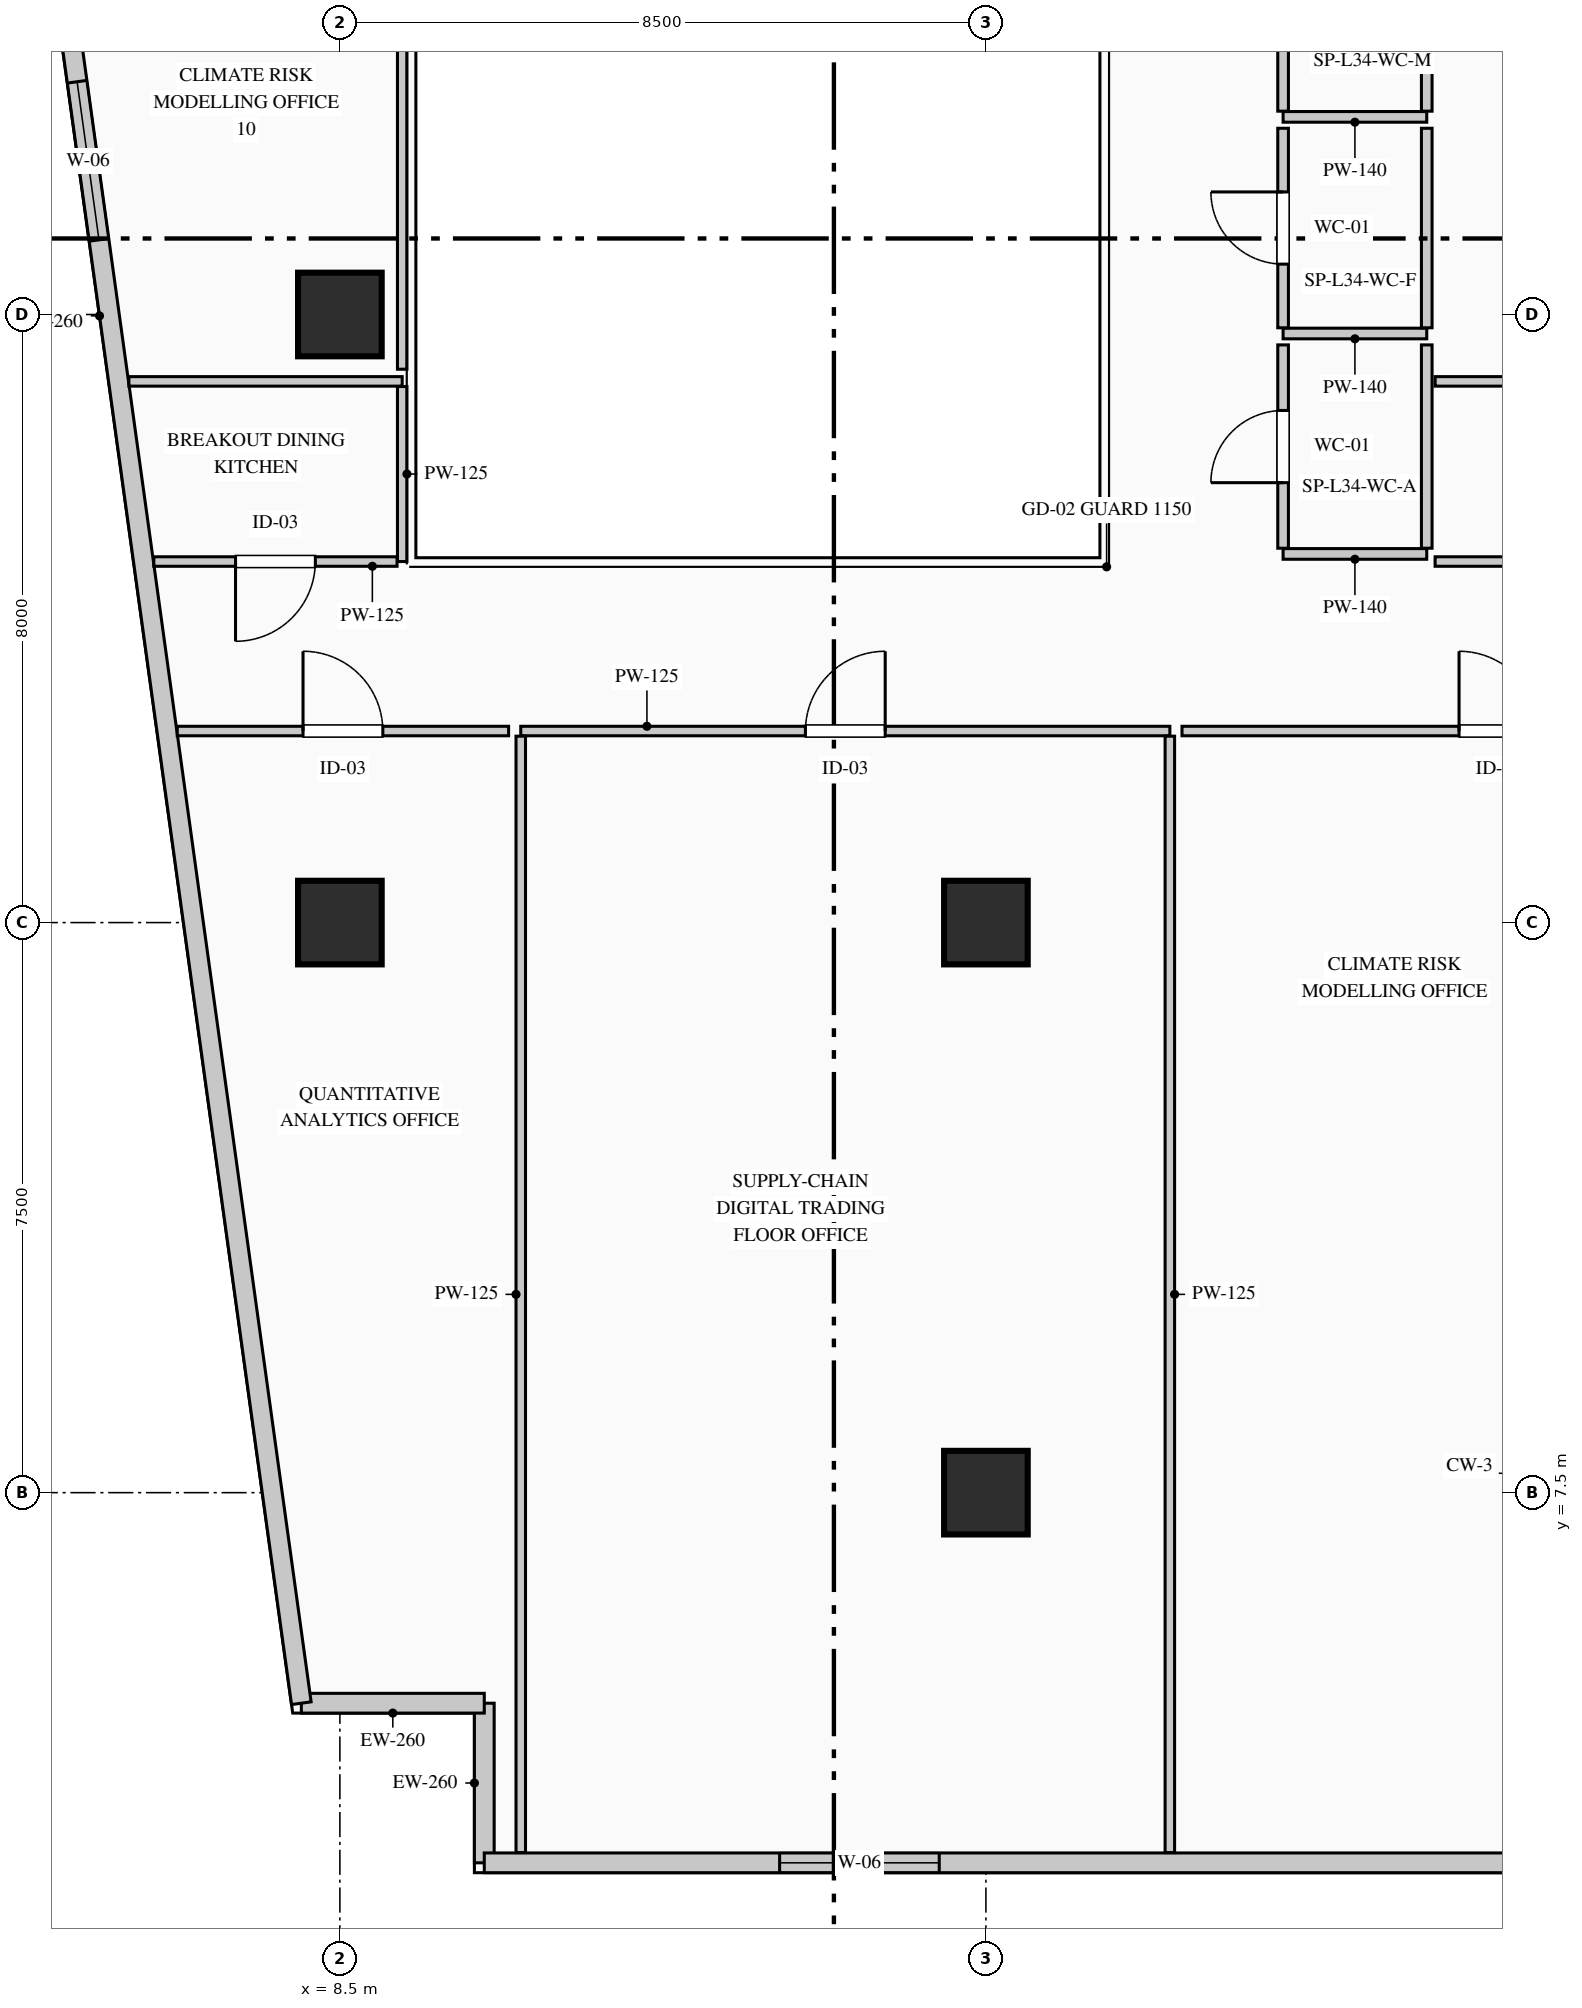
"""IFC4 building model, lengths in metres.
Left out: names, types, materials, properties, quantities, classifications, styles, units other than length and angle.
Written with IfcOpenShell. Run it as: python <this file> out.ifc"""

import sys

from ifc_helpers import new_model, si_unit, direction, frame, frame_2d, origin, origin_2d, place, context, subcontext, project, spatial, rectangle, extrude, element, fill, save


model = new_model("IFC4")
c1 = context("Model", 3, precision=1e-05, world=origin(), true_north=direction((0.0, 1.0)))
c2 = subcontext(c1, "Body", "Model", "MODEL_VIEW")
j1 = project(units=[si_unit("LENGTHUNIT", "METRE"), si_unit("PLANEANGLEUNIT", "RADIAN")], contexts=[c1])
p1 = place(None, origin())
s1 = spatial("IfcSite", under=j1, at=p1, CompositionType="ELEMENT")
p2 = place(p1, origin())
s2 = spatial("IfcBuilding", under=s1, at=p2, CompositionType="ELEMENT")
p3 = place(p2, frame((0.0, 0.0, 146.95)))
s3 = spatial("IfcBuildingStorey", under=s2, at=p3, CompositionType="ELEMENT", Elevation=146.95)
for number, where, z_axis, x_axis in (
    (1, (8.5, 15.0, 0.0), (0.0, 0.0, 1.0), (1.0, 0.0, 0.0)),
    (2, (8.5, 23.0, 0.0), (0.0, 0.0, 1.0), (1.0, 0.0, 0.0)),
    (3, (17.0, 7.5, 0.0), (0.0, 0.0, 1.0), (1.0, 0.0, 0.0)),
    (4, (17.0, 15.0, 0.0), (0.0, 0.0, 1.0), (1.0, 0.0, 0.0)),
):
    element("IfcColumn", number, at=place(p3, frame(where, z_axis=z_axis, x_axis=x_axis)), inside=s3, PredefinedType="COLUMN", context=c2, shape_type="SweptSolid", body=[
        extrude(rectangle(XDim=1.1, YDim=1.1, at=origin_2d()), origin(), (0.0, 0.0, 1.0), 3.95),
    ])
p4 = place(p3, frame((10.4, 2.63, 0.0), z_axis=(0.0, 0.0, 1.0), x_axis=(0.0, 1.0, 0.0)))
e5 = element("IfcWall", 5, at=p4, inside=s3, PredefinedType="STANDARD", context=c2, shape_type="SweptSolid", body=[
    extrude(rectangle(XDim=2.1, YDim=0.26, at=frame_2d((1.05, 0.0))), origin(), (0.0, 0.0, 1.0), 3.69),
])
p5 = place(p3, frame((10.4, 4.73, 0.0), z_axis=(0.0, 0.0, 1.0), x_axis=(-1.0, 0.0, 0.0)))
e6 = element("IfcWall", 6, at=p5, inside=s3, PredefinedType="STANDARD", context=c2, shape_type="SweptSolid", body=[
    extrude(rectangle(XDim=2.407, YDim=0.26, at=frame_2d((1.204, 0.0))), origin(), (0.0, 0.0, 1.0), 3.69),
])
p6 = place(p3, frame((7.993, 4.73, 0.0), z_axis=(0.0, 0.0, 1.0), x_axis=(-0.136989009016, 0.990572567462, 0.0)))
e7 = element("IfcWall", 7, at=p6, inside=s3, PredefinedType="STANDARD", context=c2, shape_type="SweptSolid", body=[
    extrude(rectangle(XDim=36.888, YDim=0.26, at=frame_2d((18.444, 0.0))), origin(), (0.0, 0.0, 1.0), 3.69),
])
p7 = place(p6, frame((19.435, 0.0, 0.9)))
e8 = element("IfcOpeningElement", 8, at=p7, cuts=e7, PredefinedType="OPENING", context=c2, shape_type="SweptSolid", body=[
    extrude(rectangle(XDim=2.1, YDim=2.0, at=frame_2d((1.05, 1.0))), frame((0.0, 0.14, 0.0), z_axis=(0.0, -1.0, 0.0), x_axis=(1.0, 0.0, 0.0)), (0.0, 0.0, 1.0), 0.28),
])
p8 = place(p3, frame((24.11, 2.63, 0.0), z_axis=(0.0, 0.0, 1.0), x_axis=(-1.0, 0.0, 0.0)))
e9 = element("IfcWall", 9, at=p8, inside=s3, PredefinedType="STANDARD", context=c2, shape_type="SweptSolid", body=[
    extrude(rectangle(XDim=13.71, YDim=0.26, at=frame_2d((6.855, 0.0))), origin(), (0.0, 0.0, 1.0), 3.69),
])
p9 = place(p8, frame((7.724, 0.0, 0.9)))
e10 = element("IfcOpeningElement", 10, at=p9, cuts=e9, PredefinedType="OPENING", context=c2, shape_type="SweptSolid", body=[
    extrude(rectangle(XDim=2.1, YDim=2.0, at=frame_2d((1.05, 1.0))), frame((0.0, 0.14, 0.0), z_axis=(0.0, -1.0, 0.0), x_axis=(1.0, 0.0, 0.0)), (0.0, 0.0, 1.0), 0.28),
])
p10 = place(p3, frame((22.8, 25.6, 0.0), z_axis=(0.0, 0.0, 1.0), x_axis=(-1.0, 0.0, 0.0)))
e11 = element("IfcWall", 11, at=p10, inside=s3, PredefinedType="PARTITIONING", context=c2, shape_type="SweptSolid", body=[
    extrude(rectangle(XDim=1.89, YDim=0.14, at=frame_2d((0.945, 0.0))), origin(), (0.0, 0.0, 1.0), 3.69),
])
p11 = place(p3, frame((20.91, 25.675, 0.0), z_axis=(0.0, 0.0, 1.0), x_axis=(0.0, 1.0, 0.0)))
e12 = element("IfcWall", 12, at=p11, inside=s3, PredefinedType="PARTITIONING", context=c2, shape_type="SweptSolid", body=[
    extrude(rectangle(XDim=2.775, YDim=0.14, at=frame_2d((1.387, 0.0))), origin(), (0.0, 0.0, 1.0), 3.69),
])
p12 = place(p11, frame((0.913, 0.0, 0.0)))
e13 = element("IfcOpeningElement", 13, at=p12, cuts=e12, PredefinedType="OPENING", context=c2, shape_type="SweptSolid", body=[
    extrude(rectangle(XDim=0.95, YDim=2.15, at=frame_2d((0.475, 1.075))), frame((0.0, 0.08, 0.0), z_axis=(0.0, -1.0, 0.0), x_axis=(1.0, 0.0, 0.0)), (0.0, 0.0, 1.0), 0.16),
])
p13 = place(p3, frame((22.8, 28.375, 0.0), z_axis=(0.0, 0.0, 1.0), x_axis=(0.0, -1.0, 0.0)))
e14 = element("IfcWall", 14, at=p13, inside=s3, PredefinedType="PARTITIONING", context=c2, shape_type="SweptSolid", body=[
    extrude(rectangle(XDim=2.7, YDim=0.14, at=frame_2d((1.35, 0.0))), origin(), (0.0, 0.0, 1.0), 3.315),
])
p14 = place(p3, frame((22.8, 22.75, 0.0), z_axis=(0.0, 0.0, 1.0), x_axis=(-1.0, 0.0, 0.0)))
e15 = element("IfcWall", 15, at=p14, inside=s3, PredefinedType="PARTITIONING", context=c2, shape_type="SweptSolid", body=[
    extrude(rectangle(XDim=1.89, YDim=0.14, at=frame_2d((0.945, 0.0))), origin(), (0.0, 0.0, 1.0), 3.69),
])
p15 = place(p3, frame((20.91, 22.825, 0.0), z_axis=(0.0, 0.0, 1.0), x_axis=(0.0, 1.0, 0.0)))
e16 = element("IfcWall", 16, at=p15, inside=s3, PredefinedType="PARTITIONING", context=c2, shape_type="SweptSolid", body=[
    extrude(rectangle(XDim=2.625, YDim=0.14, at=frame_2d((1.312, 0.0))), origin(), (0.0, 0.0, 1.0), 3.69),
])
p16 = place(p15, frame((0.837, 0.0, 0.0)))
e17 = element("IfcOpeningElement", 17, at=p16, cuts=e16, PredefinedType="OPENING", context=c2, shape_type="SweptSolid", body=[
    extrude(rectangle(XDim=0.95, YDim=2.15, at=frame_2d((0.475, 1.075))), frame((0.0, 0.08, 0.0), z_axis=(0.0, -1.0, 0.0), x_axis=(1.0, 0.0, 0.0)), (0.0, 0.0, 1.0), 0.16),
])
p17 = place(p3, frame((22.8, 25.45, 0.0), z_axis=(0.0, 0.0, 1.0), x_axis=(0.0, -1.0, 0.0)))
e18 = element("IfcWall", 18, at=p17, inside=s3, PredefinedType="PARTITIONING", context=c2, shape_type="SweptSolid", body=[
    extrude(rectangle(XDim=2.625, YDim=0.14, at=frame_2d((1.312, 0.0))), origin(), (0.0, 0.0, 1.0), 3.315),
])
p18 = place(p3, frame((22.8, 19.85, 0.0), z_axis=(0.0, 0.0, 1.0), x_axis=(-1.0, 0.0, 0.0)))
e19 = element("IfcWall", 19, at=p18, inside=s3, PredefinedType="PARTITIONING", context=c2, shape_type="SweptSolid", body=[
    extrude(rectangle(XDim=1.89, YDim=0.14, at=frame_2d((0.945, 0.0))), origin(), (0.0, 0.0, 1.0), 3.69),
])
p19 = place(p3, frame((20.91, 19.925, 0.0), z_axis=(0.0, 0.0, 1.0), x_axis=(0.0, 1.0, 0.0)))
e20 = element("IfcWall", 20, at=p19, inside=s3, PredefinedType="PARTITIONING", context=c2, shape_type="SweptSolid", body=[
    extrude(rectangle(XDim=2.675, YDim=0.14, at=frame_2d((1.337, 0.0))), origin(), (0.0, 0.0, 1.0), 3.69),
])
p20 = place(p19, frame((0.863, 0.0, 0.0)))
e21 = element("IfcOpeningElement", 21, at=p20, cuts=e20, PredefinedType="OPENING", context=c2, shape_type="SweptSolid", body=[
    extrude(rectangle(XDim=0.95, YDim=2.15, at=frame_2d((0.475, 1.075))), frame((0.0, 0.08, 0.0), z_axis=(0.0, -1.0, 0.0), x_axis=(1.0, 0.0, 0.0)), (0.0, 0.0, 1.0), 0.16),
])
p21 = place(p3, frame((22.8, 22.6, 0.0), z_axis=(0.0, 0.0, 1.0), x_axis=(0.0, -1.0, 0.0)))
e22 = element("IfcWall", 22, at=p21, inside=s3, PredefinedType="PARTITIONING", context=c2, shape_type="SweptSolid", body=[
    extrude(rectangle(XDim=2.675, YDim=0.14, at=frame_2d((1.337, 0.0))), origin(), (0.0, 0.0, 1.0), 3.315),
])
p22 = place(p3, frame((10.88, 17.52, 0.0), z_axis=(0.0, 0.0, 1.0), x_axis=(1.0, 0.0, 0.0)))
e23 = element("IfcWall", 23, at=p22, inside=s3, PredefinedType="PARTITIONING", context=c2, shape_type="SweptSolid", body=[
    extrude(rectangle(XDim=8.54, YDim=0.125, at=frame_2d((4.27, 0.0))), origin(), (0.0, 0.0, 1.0), 3.69),
])
p23 = place(p22, frame((3.745, 0.0, 0.0)))
e24 = element("IfcOpeningElement", 24, at=p23, cuts=e23, PredefinedType="OPENING", context=c2, shape_type="SweptSolid", body=[
    extrude(rectangle(XDim=1.05, YDim=2.15, at=frame_2d((0.525, 1.075))), frame((0.0, 0.073, 0.0), z_axis=(0.0, -1.0, 0.0), x_axis=(1.0, 0.0, 0.0)), (0.0, 0.0, 1.0), 0.145),
])
for number, where, z_axis, x_axis in (
    (25, (19.42, 17.452, 0.0), (0.0, 0.0, 1.0), (0.0, -1.0, 0.0)),
    (26, (10.88, 2.765, 0.0), (0.0, 0.0, 1.0), (0.0, 1.0, 0.0)),
):
    element("IfcWall", number, at=place(p3, frame(where, z_axis=z_axis, x_axis=x_axis)), inside=s3, PredefinedType="PARTITIONING", context=c2, shape_type="SweptSolid", body=[
        extrude(rectangle(XDim=14.688, YDim=0.125, at=frame_2d((7.344, 0.0))), origin(), (0.0, 0.0, 1.0), 3.69),
    ])
p24 = place(p3, frame((19.58, 17.52, 0.0), z_axis=(0.0, 0.0, 1.0), x_axis=(1.0, 0.0, 0.0)))
e27 = element("IfcWall", 27, at=p24, inside=s3, PredefinedType="PARTITIONING", context=c2, shape_type="SweptSolid", body=[
    extrude(rectangle(XDim=8.34, YDim=0.125, at=frame_2d((4.17, 0.0))), origin(), (0.0, 0.0, 1.0), 3.475),
])
p25 = place(p24, frame((3.645, 0.0, 0.0)))
e28 = element("IfcOpeningElement", 28, at=p25, cuts=e27, PredefinedType="OPENING", context=c2, shape_type="SweptSolid", body=[
    extrude(rectangle(XDim=1.05, YDim=2.15, at=frame_2d((0.525, 1.075))), frame((0.0, 0.073, 0.0), z_axis=(0.0, -1.0, 0.0), x_axis=(1.0, 0.0, 0.0)), (0.0, 0.0, 1.0), 0.145),
])
p26 = place(p3, frame((6.36, 17.52, 0.0), z_axis=(0.0, 0.0, 1.0), x_axis=(1.0, 0.0, 0.0)))
e29 = element("IfcWall", 29, at=p26, inside=s3, PredefinedType="PARTITIONING", context=c2, shape_type="SweptSolid", body=[
    extrude(rectangle(XDim=4.36, YDim=0.125, at=frame_2d((2.18, 0.0))), origin(), (0.0, 0.0, 1.0), 3.69),
])
p27 = place(p26, frame((1.655, 0.0, 0.0)))
e30 = element("IfcOpeningElement", 30, at=p27, cuts=e29, PredefinedType="OPENING", context=c2, shape_type="SweptSolid", body=[
    extrude(rectangle(XDim=1.05, YDim=2.15, at=frame_2d((0.525, 1.075))), frame((0.0, 0.073, 0.0), z_axis=(0.0, -1.0, 0.0), x_axis=(1.0, 0.0, 0.0)), (0.0, 0.0, 1.0), 0.145),
])
p28 = place(p3, frame((25.976, 19.75, 0.0), z_axis=(0.0, 0.0, 1.0), x_axis=(-1.0, 0.0, 0.0)))
e31 = element("IfcWall", 31, at=p28, inside=s3, PredefinedType="PARTITIONING", context=c2, shape_type="SweptSolid", body=[
    extrude(rectangle(XDim=3.066, YDim=0.125, at=frame_2d((1.533, 0.0))), origin(), (0.0, 0.0, 1.0), 3.69),
])
p29 = place(p28, frame((1.008, 0.0, 0.0)))
e32 = element("IfcOpeningElement", 32, at=p29, cuts=e31, PredefinedType="OPENING", context=c2, shape_type="SweptSolid", body=[
    extrude(rectangle(XDim=1.05, YDim=2.15, at=frame_2d((0.525, 1.075))), frame((0.0, 0.073, 0.0), z_axis=(0.0, -1.0, 0.0), x_axis=(1.0, 0.0, 0.0)), (0.0, 0.0, 1.0), 0.145),
])
p30 = place(p3, frame((22.91, 22.12, 0.0), z_axis=(0.0, 0.0, 1.0), x_axis=(1.0, 0.0, 0.0)))
e33 = element("IfcWall", 33, at=p30, inside=s3, PredefinedType="PARTITIONING", context=c2, shape_type="SweptSolid", body=[
    extrude(rectangle(XDim=3.135, YDim=0.125, at=frame_2d((1.567, 0.0))), origin(), (0.0, 0.0, 1.0), 3.69),
])
p31 = place(p3, frame((5.724, 22.12, 0.0), z_axis=(0.0, 0.0, 1.0), x_axis=(1.0, 0.0, 0.0)))
e34 = element("IfcWall", 34, at=p31, inside=s3, PredefinedType="PARTITIONING", context=c2, shape_type="SweptSolid", body=[
    extrude(rectangle(XDim=3.596, YDim=0.125, at=frame_2d((1.798, 0.0))), origin(), (0.0, 0.0, 1.0), 3.69),
])
p32 = place(p3, frame((9.32, 22.052, 0.0), z_axis=(0.0, 0.0, 1.0), x_axis=(0.0, -1.0, 0.0)))
e35 = element("IfcWall", 35, at=p32, inside=s3, PredefinedType="PARTITIONING", context=c2, shape_type="SweptSolid", body=[
    extrude(rectangle(XDim=2.302, YDim=0.125, at=frame_2d((1.151, 0.0))), origin(), (0.0, 0.0, 1.0), 3.315),
])
p33 = place(p3, frame((9.252, 19.75, 0.0), z_axis=(0.0, 0.0, 1.0), x_axis=(-1.0, 0.0, 0.0)))
e36 = element("IfcWall", 36, at=p33, inside=s3, PredefinedType="PARTITIONING", context=c2, shape_type="SweptSolid", body=[
    extrude(rectangle(XDim=3.2, YDim=0.125, at=frame_2d((1.6, 0.0))), origin(), (0.0, 0.0, 1.0), 3.69),
])
p34 = place(p33, frame((1.075, 0.0, 0.0)))
e37 = element("IfcOpeningElement", 37, at=p34, cuts=e36, PredefinedType="OPENING", context=c2, shape_type="SweptSolid", body=[
    extrude(rectangle(XDim=1.05, YDim=2.15, at=frame_2d((0.525, 1.075))), frame((0.0, 0.073, 0.0), z_axis=(0.0, -1.0, 0.0), x_axis=(1.0, 0.0, 0.0)), (0.0, 0.0, 1.0), 0.145),
])
p35 = place(p3, frame((9.32, 28.502, 0.0), z_axis=(0.0, 0.0, 1.0), x_axis=(0.0, -1.0, 0.0)))
e38 = element("IfcWall", 38, at=p35, inside=s3, PredefinedType="PARTITIONING", context=c2, shape_type="SweptSolid", body=[
    extrude(rectangle(XDim=6.222, YDim=0.125, at=frame_2d((3.111, 0.0))), origin(), (0.0, 0.0, 1.0), 3.315),
])
p36 = place(p7, origin())
e39 = element("IfcWindow", 39, at=p36, inside=s3, PartitioningType="DOUBLE_PANEL_VERTICAL", PredefinedType="WINDOW", context=c2, shape_type="SweptSolid", body=[
    extrude(rectangle(XDim=2.1, YDim=2.0, at=frame_2d((1.05, 1.0))), frame((0.0, 0.03, 0.0), z_axis=(0.0, -1.0, 0.0), x_axis=(1.0, 0.0, 0.0)), (0.0, 0.0, 1.0), 0.06),
])
fill(e8, e39)
p37 = place(p9, origin())
e40 = element("IfcWindow", 40, at=p37, inside=s3, PartitioningType="DOUBLE_PANEL_VERTICAL", PredefinedType="WINDOW", context=c2, shape_type="SweptSolid", body=[
    extrude(rectangle(XDim=2.1, YDim=2.0, at=frame_2d((1.05, 1.0))), frame((0.0, 0.03, 0.0), z_axis=(0.0, -1.0, 0.0), x_axis=(1.0, 0.0, 0.0)), (0.0, 0.0, 1.0), 0.06),
])
fill(e10, e40)
p38 = place(p16, origin())
e41 = element("IfcDoor", 41, at=p38, inside=s3, OperationType="SINGLE_SWING_RIGHT", PredefinedType="DOOR", context=c2, shape_type="SweptSolid", body=[
    extrude(rectangle(XDim=0.95, YDim=2.15, at=frame_2d((0.475, 1.075))), frame((0.0, 0.025, 0.0), z_axis=(0.0, -1.0, 0.0), x_axis=(1.0, 0.0, 0.0)), (0.0, 0.0, 1.0), 0.05),
])
fill(e17, e41)
p39 = place(p20, origin())
e42 = element("IfcDoor", 42, at=p39, inside=s3, OperationType="SINGLE_SWING_LEFT", PredefinedType="DOOR", context=c2, shape_type="SweptSolid", body=[
    extrude(rectangle(XDim=0.95, YDim=2.15, at=frame_2d((0.475, 1.075))), frame((0.0, 0.025, 0.0), z_axis=(0.0, -1.0, 0.0), x_axis=(1.0, 0.0, 0.0)), (0.0, 0.0, 1.0), 0.05),
])
fill(e21, e42)
p40 = place(p23, origin())
e43 = element("IfcDoor", 43, at=p40, inside=s3, OperationType="SINGLE_SWING_RIGHT", PredefinedType="DOOR", context=c2, shape_type="SweptSolid", body=[
    extrude(rectangle(XDim=1.05, YDim=2.15, at=frame_2d((0.525, 1.075))), frame((0.0, 0.025, 0.0), z_axis=(0.0, -1.0, 0.0), x_axis=(1.0, 0.0, 0.0)), (0.0, 0.0, 1.0), 0.05),
])
fill(e24, e43)
p41 = place(p25, origin())
e44 = element("IfcDoor", 44, at=p41, inside=s3, OperationType="SINGLE_SWING_LEFT", PredefinedType="DOOR", context=c2, shape_type="SweptSolid", body=[
    extrude(rectangle(XDim=1.05, YDim=2.15, at=frame_2d((0.525, 1.075))), frame((0.0, 0.025, 0.0), z_axis=(0.0, -1.0, 0.0), x_axis=(1.0, 0.0, 0.0)), (0.0, 0.0, 1.0), 0.05),
])
fill(e28, e44)
p42 = place(p27, origin())
e45 = element("IfcDoor", 45, at=p42, inside=s3, OperationType="SINGLE_SWING_LEFT", PredefinedType="DOOR", context=c2, shape_type="SweptSolid", body=[
    extrude(rectangle(XDim=1.05, YDim=2.15, at=frame_2d((0.525, 1.075))), frame((0.0, 0.025, 0.0), z_axis=(0.0, -1.0, 0.0), x_axis=(1.0, 0.0, 0.0)), (0.0, 0.0, 1.0), 0.05),
])
fill(e30, e45)
p43 = place(p34, origin())
e46 = element("IfcDoor", 46, at=p43, inside=s3, OperationType="SINGLE_SWING_RIGHT", PredefinedType="DOOR", context=c2, shape_type="SweptSolid", body=[
    extrude(rectangle(XDim=1.05, YDim=2.15, at=frame_2d((0.525, 1.075))), frame((0.0, 0.025, 0.0), z_axis=(0.0, -1.0, 0.0), x_axis=(1.0, 0.0, 0.0)), (0.0, 0.0, 1.0), 0.05),
])
fill(e37, e46)
save(model, sys.argv[1])
